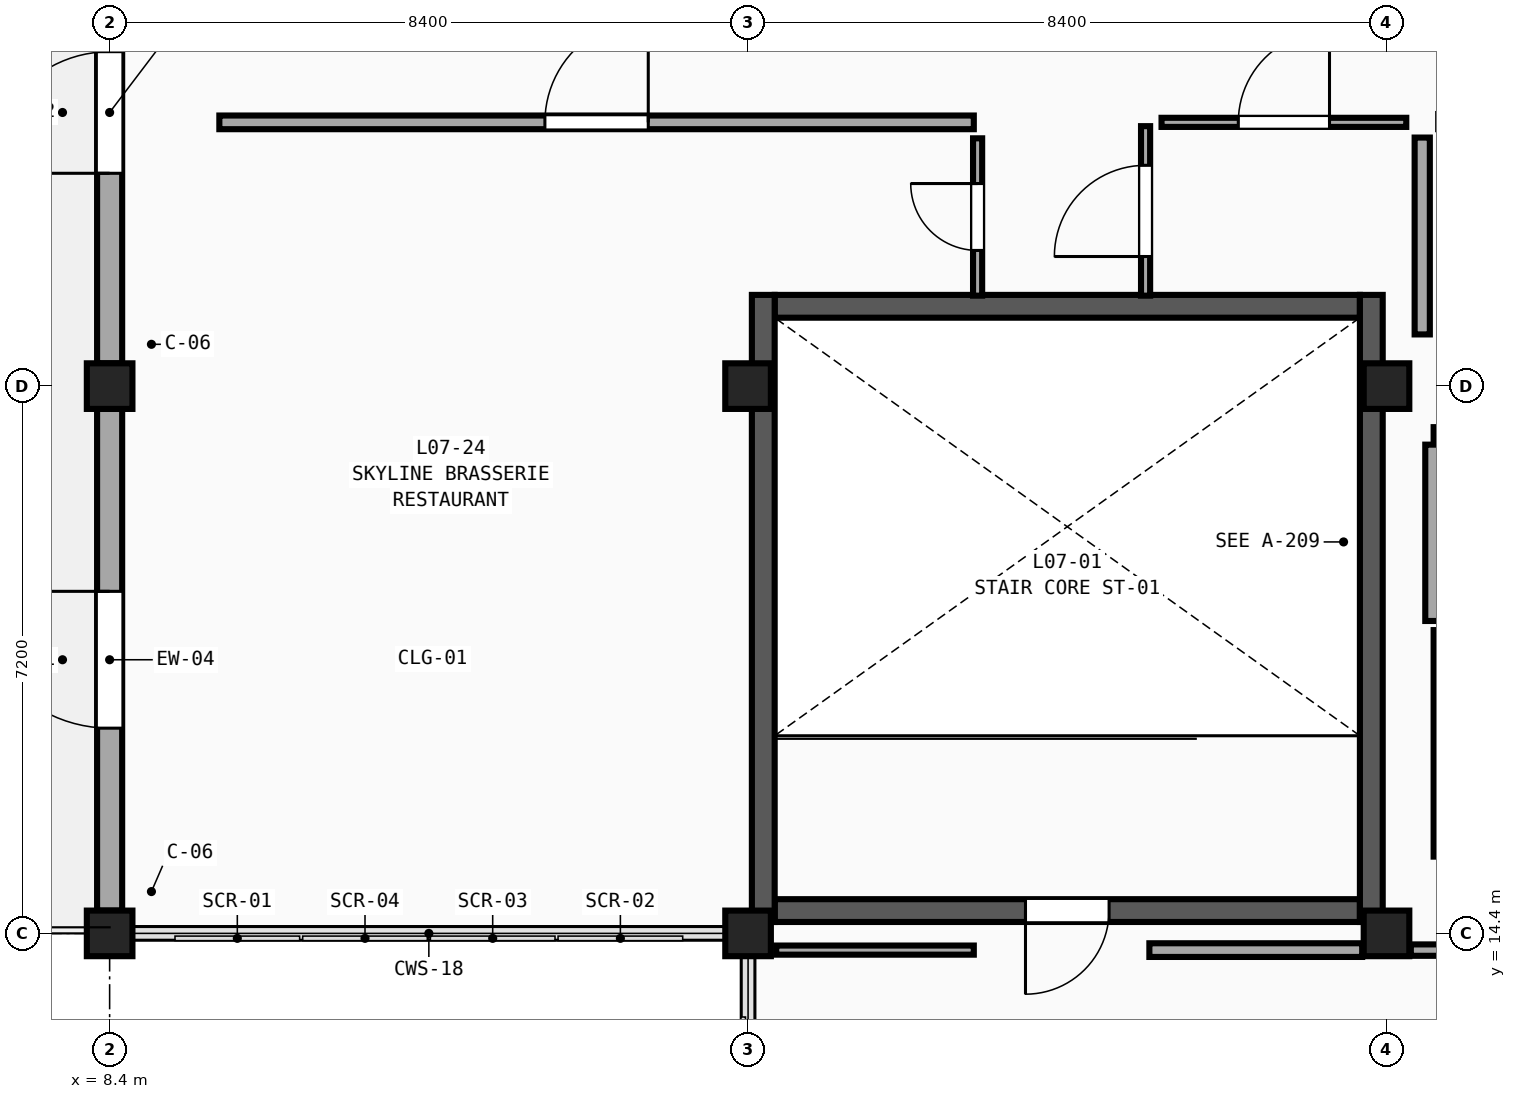
"""IFC4 building model, lengths in metres.
Left out: names, types, materials, properties, quantities, classifications, styles, units other than length and angle.
Written with IfcOpenShell. Run it as: python <this file> out.ifc"""

import sys

from ifc_helpers import new_model, si_unit, direction, frame, frame_2d, origin, origin_2d, place, context, subcontext, project, spatial, rectangle, extrude, element, fill, save


model = new_model("IFC4")
c1 = context("Model", 3, precision=1e-05, world=origin(), true_north=direction((0.0, 1.0)))
c2 = subcontext(c1, "Body", "Model", "MODEL_VIEW")
j1 = project(units=[si_unit("LENGTHUNIT", "METRE"), si_unit("PLANEANGLEUNIT", "RADIAN")], contexts=[c1])
p1 = place(None, origin())
s1 = spatial("IfcSite", under=j1, at=p1, CompositionType="ELEMENT")
p2 = place(p1, origin())
s2 = spatial("IfcBuilding", under=s1, at=p2, CompositionType="ELEMENT")
p3 = place(p2, frame((0.0, 0.0, 32.1)))
s3 = spatial("IfcBuildingStorey", under=s2, at=p3, CompositionType="ELEMENT", Elevation=32.1)
for number, where, z_axis, x_axis in (
    (1, (8.4, 14.4, 0.0), (0.0, 0.0, 1.0), (1.0, 0.0, 0.0)),
    (2, (8.4, 21.6, 0.0), (0.0, 0.0, 1.0), (1.0, 0.0, 0.0)),
    (3, (16.8, 14.4, 0.0), (0.0, 0.0, 1.0), (1.0, 0.0, 0.0)),
    (4, (16.8, 21.6, 0.0), (0.0, 0.0, 1.0), (1.0, 0.0, 0.0)),
    (5, (25.2, 14.4, 0.0), (0.0, 0.0, 1.0), (1.0, 0.0, 0.0)),
    (6, (25.2, 21.6, 0.0), (0.0, 0.0, 1.0), (1.0, 0.0, 0.0)),
):
    element("IfcColumn", number, at=place(p3, frame(where, z_axis=z_axis, x_axis=x_axis)), inside=s3, PredefinedType="COLUMN", context=c2, shape_type="SweptSolid", body=[
        extrude(rectangle(XDim=0.6, YDim=0.6, at=origin_2d()), origin(), (0.0, 0.0, 1.0), 4.5),
    ])
p4 = place(p3, frame((8.4, 14.7, 0.0), z_axis=(0.0, 0.0, 1.0), x_axis=(0.0, 1.0, 0.0)))
e7 = element("IfcWall", 7, at=p4, inside=s3, PredefinedType="SOLIDWALL", context=c2, shape_type="SweptSolid", body=[
    extrude(rectangle(XDim=6.6, YDim=0.33, at=frame_2d((3.3, 0.0))), origin(), (0.0, 0.0, 1.0), 3.69),
])
p5 = place(p4, frame((2.4, 0.0, 0.0)))
e8 = element("IfcOpeningElement", 8, at=p5, cuts=e7, PredefinedType="OPENING", context=c2, shape_type="SweptSolid", body=[
    extrude(rectangle(XDim=1.8, YDim=2.25, at=frame_2d((0.9, 1.125))), frame((0.0, 0.185, 0.0), z_axis=(0.0, -1.0, 0.0), x_axis=(1.0, 0.0, 0.0)), (0.0, 0.0, 1.0), 0.37),
])
p6 = place(p3, frame((8.4, 21.9, 0.0), z_axis=(0.0, 0.0, 1.0), x_axis=(0.0, 1.0, 0.0)))
e9 = element("IfcWall", 9, at=p6, inside=s3, PredefinedType="SOLIDWALL", context=c2, shape_type="SweptSolid", body=[
    extrude(rectangle(XDim=6.6, YDim=0.33, at=frame_2d((3.3, 0.0))), origin(), (0.0, 0.0, 1.0), 3.69),
])
p7 = place(p6, frame((2.5, 0.0, 0.0)))
e10 = element("IfcOpeningElement", 10, at=p7, cuts=e9, PredefinedType="OPENING", context=c2, shape_type="SweptSolid", body=[
    extrude(rectangle(XDim=1.6, YDim=2.2, at=frame_2d((0.8, 1.1))), frame((0.0, 0.185, 0.0), z_axis=(0.0, -1.0, 0.0), x_axis=(1.0, 0.0, 0.0)), (0.0, 0.0, 1.0), 0.37),
])
p8 = place(p3, frame((24.85, 14.7, 0.0), z_axis=(0.0, 0.0, 1.0), x_axis=(-1.0, 0.0, 0.0)))
e11 = element("IfcWall", 11, at=p8, inside=s3, PredefinedType="SHEAR", context=c2, shape_type="SweptSolid", body=[
    extrude(rectangle(XDim=7.7, YDim=0.3, at=frame_2d((3.85, 0.0))), origin(), (0.0, 0.0, 1.0), 4.5),
])
p9 = place(p8, frame((3.3, 0.0, 0.0)))
e12 = element("IfcOpeningElement", 12, at=p9, cuts=e11, PredefinedType="OPENING", context=c2, shape_type="SweptSolid", body=[
    extrude(rectangle(XDim=1.1, YDim=2.2, at=frame_2d((0.55, 1.1))), frame((0.0, 0.17, 0.0), z_axis=(0.0, -1.0, 0.0), x_axis=(1.0, 0.0, 0.0)), (0.0, 0.0, 1.0), 0.34),
])
p10 = place(p3, frame((17.15, 22.65, 0.0), z_axis=(0.0, 0.0, 1.0), x_axis=(1.0, 0.0, 0.0)))
e13 = element("IfcWall", 13, at=p10, inside=s3, PredefinedType="SHEAR", context=c2, shape_type="SweptSolid", body=[
    extrude(rectangle(XDim=7.7, YDim=0.3, at=frame_2d((3.85, 0.0))), origin(), (0.0, 0.0, 1.0), 4.5),
])
for number, where, z_axis, x_axis in (
    (14, (17.0, 22.8, 0.0), (0.0, 0.0, 1.0), (0.0, -1.0, 0.0)),
    (15, (25.0, 14.55, 0.0), (0.0, 0.0, 1.0), (0.0, 1.0, 0.0)),
):
    element("IfcWall", number, at=place(p3, frame(where, z_axis=z_axis, x_axis=x_axis)), inside=s3, PredefinedType="SHEAR", context=c2, shape_type="SweptSolid", body=[
        extrude(rectangle(XDim=8.25, YDim=0.3, at=frame_2d((4.125, 0.0))), origin(), (0.0, 0.0, 1.0), 4.5),
    ])
p11 = place(p3, frame((25.94, 18.39, 0.0), z_axis=(0.0, 0.0, 1.0), x_axis=(0.0, -1.0, 0.0)))
e16 = element("IfcWall", 16, at=p11, inside=s3, PredefinedType="SHEAR", context=c2, shape_type="SweptSolid", body=[
    extrude(rectangle(XDim=2.98, YDim=0.24, at=frame_2d((1.49, 0.0))), origin(), (0.0, 0.0, 1.0), 5.35),
])
p12 = place(p3, frame((25.82, 20.95, 0.0), z_axis=(0.0, 0.0, 1.0), x_axis=(1.0, 0.0, 0.0)))
e17 = element("IfcWall", 17, at=p12, inside=s3, PredefinedType="SOLIDWALL", context=c2, shape_type="SweptSolid", body=[
    extrude(rectangle(XDim=2.54, YDim=0.22, at=frame_2d((1.27, 0.0))), origin(), (0.0, 0.0, 1.0), 3.79),
])
p13 = place(p12, frame((0.745, 0.0, 0.0)))
e18 = element("IfcOpeningElement", 18, at=p13, cuts=e17, PredefinedType="OPENING", context=c2, shape_type="SweptSolid", body=[
    extrude(rectangle(XDim=1.05, YDim=2.15, at=frame_2d((0.525, 1.075))), frame((0.0, 0.13, 0.0), z_axis=(0.0, -1.0, 0.0), x_axis=(1.0, 0.0, 0.0)), (0.0, 0.0, 1.0), 0.26),
])
p14 = place(p3, frame((25.82, 18.51, 0.0), z_axis=(0.0, 0.0, 1.0), x_axis=(0.0, 1.0, 0.0)))
e19 = element("IfcWall", 19, at=p14, inside=s3, PredefinedType="SOLIDWALL", context=c2, shape_type="SweptSolid", body=[
    extrude(rectangle(XDim=2.32, YDim=0.22, at=frame_2d((1.16, 0.0))), origin(), (0.0, 0.0, 1.0), 3.79),
])
p15 = place(p3, frame((22.08, 14.18, 0.0), z_axis=(0.0, 0.0, 1.0), x_axis=(1.0, 0.0, 0.0)))
e20 = element("IfcWall", 20, at=p15, inside=s3, PredefinedType="PARTITIONING", context=c2, shape_type="SweptSolid", body=[
    extrude(rectangle(XDim=2.8, YDim=0.18, at=frame_2d((1.4, 0.0))), origin(), (0.0, 0.0, 1.0), 3.79),
])
p16 = place(p3, frame((25.52, 14.18, 0.0), z_axis=(0.0, 0.0, 1.0), x_axis=(1.0, 0.0, 0.0)))
e21 = element("IfcWall", 21, at=p16, inside=s3, PredefinedType="PARTITIONING", context=c2, shape_type="SweptSolid", body=[
    extrude(rectangle(XDim=7.71, YDim=0.15, at=frame_2d((3.855, 0.0))), origin(), (0.0, 0.0, 1.0), 3.79),
])
p17 = place(p16, frame((3.335, 0.0, 0.0)))
e22 = element("IfcOpeningElement", 22, at=p17, cuts=e21, PredefinedType="OPENING", context=c2, shape_type="SweptSolid", body=[
    extrude(rectangle(XDim=1.04, YDim=2.05, at=frame_2d((0.52, 1.025))), frame((0.0, 0.095, 0.0), z_axis=(0.0, -1.0, 0.0), x_axis=(1.0, 0.0, 0.0)), (0.0, 0.0, 1.0), 0.19),
])
p18 = place(p3, frame((9.844, 25.07, 0.0), z_axis=(0.0, 0.0, 1.0), x_axis=(1.0, 0.0, 0.0)))
e23 = element("IfcWall", 23, at=p18, inside=s3, PredefinedType="PARTITIONING", context=c2, shape_type="SweptSolid", body=[
    extrude(rectangle(XDim=9.927, YDim=0.18, at=frame_2d((4.963, 0.0))), origin(), (0.0, 0.0, 1.0), 4.24),
])
p19 = place(p18, frame((4.283, 0.0, 0.0)))
e24 = element("IfcOpeningElement", 24, at=p19, cuts=e23, PredefinedType="OPENING", context=c2, shape_type="SweptSolid", body=[
    extrude(rectangle(XDim=1.36, YDim=2.05, at=frame_2d((0.68, 1.025))), frame((0.0, 0.11, 0.0), z_axis=(0.0, -1.0, 0.0), x_axis=(1.0, 0.0, 0.0)), (0.0, 0.0, 1.0), 0.22),
])
p20 = place(p3, frame((22.24, 25.07, 0.0), z_axis=(0.0, 0.0, 1.0), x_axis=(1.0, 0.0, 0.0)))
e25 = element("IfcWall", 25, at=p20, inside=s3, PredefinedType="PARTITIONING", context=c2, shape_type="SweptSolid", body=[
    extrude(rectangle(XDim=3.22, YDim=0.12, at=frame_2d((1.61, 0.0))), origin(), (0.0, 0.0, 1.0), 4.24),
])
p21 = place(p20, frame((1.01, 0.0, 0.0)))
e26 = element("IfcOpeningElement", 26, at=p21, cuts=e25, PredefinedType="OPENING", context=c2, shape_type="SweptSolid", body=[
    extrude(rectangle(XDim=1.2, YDim=2.37, at=frame_2d((0.6, 1.185))), frame((0.0, 0.08, 0.0), z_axis=(0.0, -1.0, 0.0), x_axis=(1.0, 0.0, 0.0)), (0.0, 0.0, 1.0), 0.16),
])
p22 = place(p3, frame((17.17, 14.18, 0.0), z_axis=(0.0, 0.0, 1.0), x_axis=(1.0, 0.0, 0.0)))
e27 = element("IfcWall", 27, at=p22, inside=s3, PredefinedType="PARTITIONING", context=c2, shape_type="SweptSolid", body=[
    extrude(rectangle(XDim=2.6, YDim=0.12, at=frame_2d((1.3, 0.0))), origin(), (0.0, 0.0, 1.0), 3.79),
])
p23 = place(p3, frame((22.03, 22.79, 0.0), z_axis=(0.0, 0.0, 1.0), x_axis=(0.0, 1.0, 0.0)))
e28 = element("IfcWall", 28, at=p23, inside=s3, PredefinedType="PARTITIONING", context=c2, shape_type="SweptSolid", body=[
    extrude(rectangle(XDim=2.23, YDim=0.12, at=frame_2d((1.115, 0.0))), origin(), (0.0, 0.0, 1.0), 4.24),
])
p24 = place(p23, frame((0.515, 0.0, 0.0)))
e29 = element("IfcOpeningElement", 29, at=p24, cuts=e28, PredefinedType="OPENING", context=c2, shape_type="SweptSolid", body=[
    extrude(rectangle(XDim=1.2, YDim=2.45, at=frame_2d((0.6, 1.225))), frame((0.0, 0.08, 0.0), z_axis=(0.0, -1.0, 0.0), x_axis=(1.0, 0.0, 0.0)), (0.0, 0.0, 1.0), 0.16),
])
p25 = place(p3, frame((19.82, 22.79, 0.0), z_axis=(0.0, 0.0, 1.0), x_axis=(0.0, 1.0, 0.0)))
e30 = element("IfcWall", 30, at=p25, inside=s3, PredefinedType="PARTITIONING", context=c2, shape_type="SweptSolid", body=[
    extrude(rectangle(XDim=2.07, YDim=0.12, at=frame_2d((1.035, 0.0))), origin(), (0.0, 0.0, 1.0), 4.24),
])
p26 = place(p25, frame((0.595, 0.0, 0.0)))
e31 = element("IfcOpeningElement", 31, at=p26, cuts=e30, PredefinedType="OPENING", context=c2, shape_type="SweptSolid", body=[
    extrude(rectangle(XDim=0.88, YDim=2.05, at=frame_2d((0.44, 1.025))), frame((0.0, 0.08, 0.0), z_axis=(0.0, -1.0, 0.0), x_axis=(1.0, 0.0, 0.0)), (0.0, 0.0, 1.0), 0.16),
])
p27 = place(p3, frame((25.67, 22.28, 0.0), z_axis=(0.0, 0.0, 1.0), x_axis=(0.0, 1.0, 0.0)))
e32 = element("IfcWall", 32, at=p27, inside=s3, PredefinedType="PLUMBINGWALL", context=c2, shape_type="SweptSolid", body=[
    extrude(rectangle(XDim=2.59, YDim=0.2, at=frame_2d((1.295, 0.0))), origin(), (0.0, 0.0, 1.0), 3.79),
])
p28 = place(p5, origin())
e33 = element("IfcDoor", 33, at=p28, inside=s3, OperationType="SINGLE_SWING_RIGHT", PredefinedType="DOOR", context=c2, shape_type="SweptSolid", body=[
    extrude(rectangle(XDim=1.8, YDim=2.25, at=frame_2d((0.9, 1.125))), frame((0.0, 0.025, 0.0), z_axis=(0.0, -1.0, 0.0), x_axis=(1.0, 0.0, 0.0)), (0.0, 0.0, 1.0), 0.05),
])
fill(e8, e33)
p29 = place(p7, origin())
e34 = element("IfcDoor", 34, at=p29, inside=s3, OperationType="SINGLE_SWING_LEFT", PredefinedType="DOOR", context=c2, shape_type="SweptSolid", body=[
    extrude(rectangle(XDim=1.6, YDim=2.2, at=frame_2d((0.8, 1.1))), frame((0.0, 0.025, 0.0), z_axis=(0.0, -1.0, 0.0), x_axis=(1.0, 0.0, 0.0)), (0.0, 0.0, 1.0), 0.05),
])
fill(e10, e34)
p30 = place(p9, origin())
e35 = element("IfcDoor", 35, at=p30, inside=s3, OperationType="SINGLE_SWING_RIGHT", PredefinedType="DOOR", context=c2, shape_type="SweptSolid", body=[
    extrude(rectangle(XDim=1.1, YDim=2.2, at=frame_2d((0.55, 1.1))), frame((0.0, 0.025, 0.0), z_axis=(0.0, -1.0, 0.0), x_axis=(1.0, 0.0, 0.0)), (0.0, 0.0, 1.0), 0.05),
])
fill(e12, e35)
p31 = place(p19, origin())
e36 = element("IfcDoor", 36, at=p31, inside=s3, OperationType="SINGLE_SWING_RIGHT", PredefinedType="DOOR", context=c2, shape_type="SweptSolid", body=[
    extrude(rectangle(XDim=1.36, YDim=2.05, at=frame_2d((0.68, 1.025))), frame((0.0, 0.025, 0.0), z_axis=(0.0, -1.0, 0.0), x_axis=(1.0, 0.0, 0.0)), (0.0, 0.0, 1.0), 0.05),
])
fill(e24, e36)
p32 = place(p21, origin())
e37 = element("IfcDoor", 37, at=p32, inside=s3, OperationType="SINGLE_SWING_RIGHT", PredefinedType="DOOR", context=c2, shape_type="SweptSolid", body=[
    extrude(rectangle(XDim=1.2, YDim=2.37, at=frame_2d((0.6, 1.185))), frame((0.0, 0.025, 0.0), z_axis=(0.0, -1.0, 0.0), x_axis=(1.0, 0.0, 0.0)), (0.0, 0.0, 1.0), 0.05),
])
fill(e26, e37)
p33 = place(p24, origin())
e38 = element("IfcDoor", 38, at=p33, inside=s3, OperationType="SINGLE_SWING_LEFT", PredefinedType="DOOR", context=c2, shape_type="SweptSolid", body=[
    extrude(rectangle(XDim=1.2, YDim=2.45, at=frame_2d((0.6, 1.225))), frame((0.0, 0.025, 0.0), z_axis=(0.0, -1.0, 0.0), x_axis=(1.0, 0.0, 0.0)), (0.0, 0.0, 1.0), 0.05),
])
fill(e29, e38)
p34 = place(p26, origin())
e39 = element("IfcDoor", 39, at=p34, inside=s3, OperationType="SINGLE_SWING_RIGHT", PredefinedType="DOOR", context=c2, shape_type="SweptSolid", body=[
    extrude(rectangle(XDim=0.88, YDim=2.05, at=frame_2d((0.44, 1.025))), frame((0.0, 0.025, 0.0), z_axis=(0.0, -1.0, 0.0), x_axis=(1.0, 0.0, 0.0)), (0.0, 0.0, 1.0), 0.05),
])
fill(e31, e39)
save(model, sys.argv[1])
